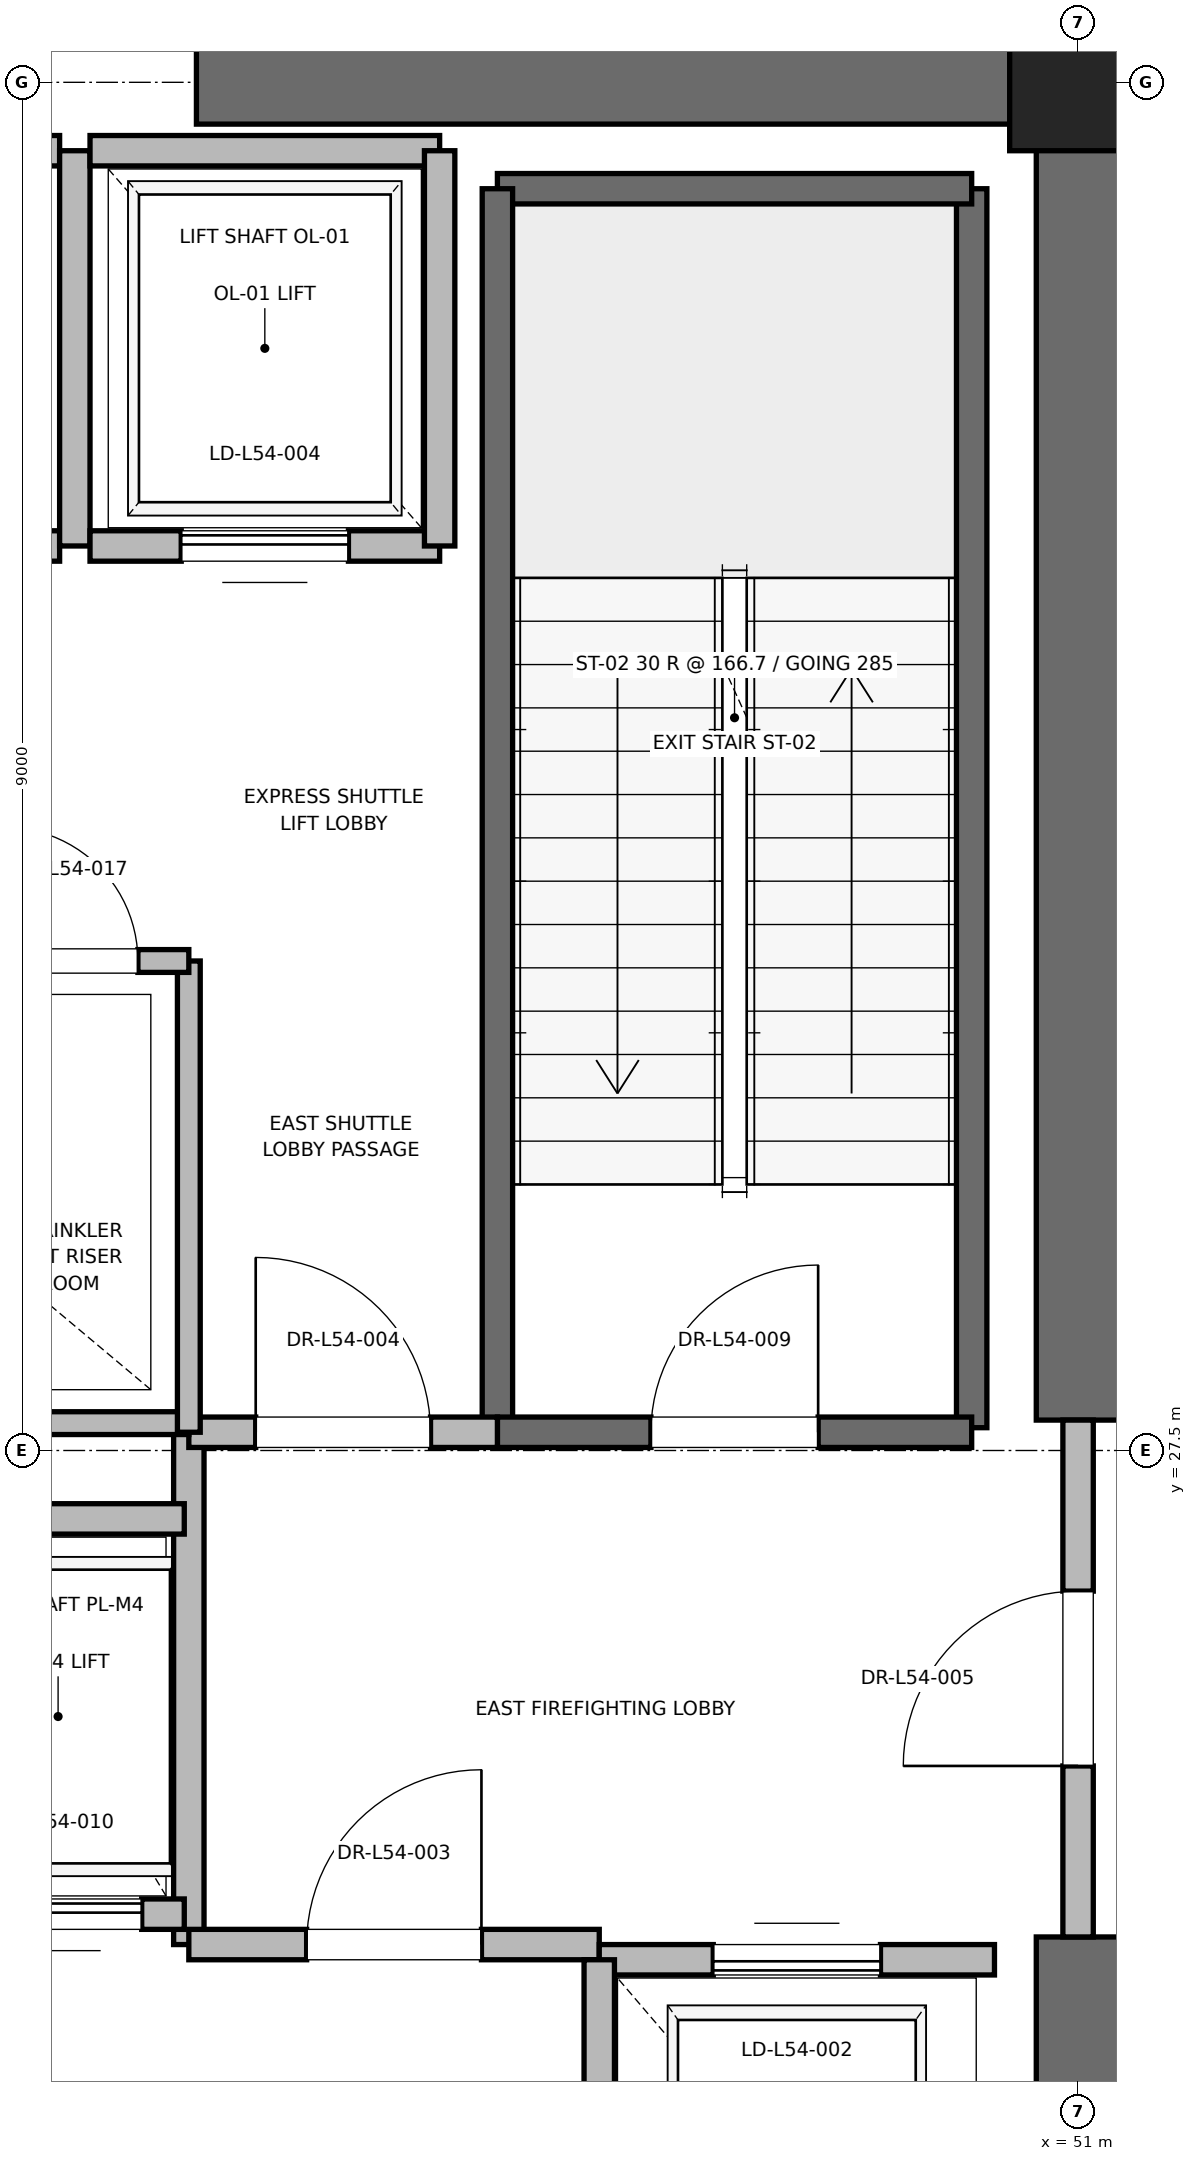
"""IFC4 building model, lengths in metres.
Left out: names, types, materials, properties, quantities, classifications, styles, units other than length and angle.
Written with IfcOpenShell. Run it as: python <this file> out.ifc"""

import sys

from ifc_helpers import new_model, si_unit, direction, frame, frame_2d, origin, origin_2d, place, context, subcontext, project, spatial, rectangle, extrude, element, fill, save


model = new_model("IFC4")
c1 = context("Model", 3, precision=1e-05, world=origin(), true_north=direction((0.0, 1.0)))
c2 = subcontext(c1, "Body", "Model", "MODEL_VIEW")
j1 = project(units=[si_unit("LENGTHUNIT", "METRE"), si_unit("PLANEANGLEUNIT", "RADIAN")], contexts=[c1])
p1 = place(None, origin())
s1 = spatial("IfcSite", under=j1, at=p1, CompositionType="ELEMENT")
p2 = place(p1, origin())
s2 = spatial("IfcBuilding", under=s1, at=p2, CompositionType="ELEMENT")
p3 = place(p2, frame((0.0, 0.0, 233.2)))
s3 = spatial("IfcBuildingStorey", under=s2, at=p3, CompositionType="ELEMENT", Elevation=233.2)
p4 = place(p3, frame((51.0, 36.5, 0.0), z_axis=(0.0, 0.0, 1.0), x_axis=(1.0, 0.0, 0.0)))
e1 = element("IfcColumn", 1, at=p4, inside=s3, PredefinedType="PILASTER", context=c2, shape_type="SweptSolid", body=[
    extrude(rectangle(XDim=0.9, YDim=0.9, at=origin_2d()), origin(), (0.0, 0.0, 1.0), 5.0),
])
for number, where, z_axis, x_axis in (
    (2, (45.2, 36.5, 0.0), (0.0, 0.0, 1.0), (1.0, 0.0, 0.0)),
    (3, (51.0, 18.5, 0.0), (0.0, 0.0, 1.0), (0.0, 1.0, 0.0)),
):
    element("IfcWall", number, at=place(p3, frame(where, z_axis=z_axis, x_axis=x_axis)), inside=s3, PredefinedType="SHEAR", context=c2, shape_type="SweptSolid", body=[
        extrude(rectangle(XDim=5.8, YDim=0.55, at=frame_2d((2.9, 0.0))), origin(), (0.0, 0.0, 1.0), 4.7),
    ])
p5 = place(p3, frame((51.0, 27.7, 0.0), z_axis=(0.0, 0.0, 1.0), x_axis=(0.0, 1.0, 0.0)))
e4 = element("IfcWall", 4, at=p5, inside=s3, PredefinedType="SHEAR", context=c2, shape_type="SweptSolid", body=[
    extrude(rectangle(XDim=8.8, YDim=0.55, at=frame_2d((4.4, 0.0))), origin(), (0.0, 0.0, 1.0), 4.7),
])
p6 = place(p3, frame((50.3, 27.65, 0.0), z_axis=(0.0, 0.0, 1.0), x_axis=(0.0, 1.0, 0.0)))
e5 = element("IfcWall", 5, at=p6, inside=s3, PredefinedType="SOLIDWALL", context=c2, shape_type="SweptSolid", body=[
    extrude(rectangle(XDim=8.15, YDim=0.2, at=frame_2d((4.075, 0.0))), origin(), (0.0, 0.0, 1.0), 4.7),
])
p7 = place(p3, frame((47.18, 35.8, 0.0), z_axis=(0.0, 0.0, 1.0), x_axis=(1.0, 0.0, 0.0)))
e6 = element("IfcWall", 6, at=p7, inside=s3, PredefinedType="SOLIDWALL", context=c2, shape_type="SweptSolid", body=[
    extrude(rectangle(XDim=3.12, YDim=0.2, at=frame_2d((1.56, 0.0))), origin(), (0.0, 0.0, 1.0), 4.7),
])
p8 = place(p3, frame((47.18, 27.62, 0.0), z_axis=(0.0, 0.0, 1.0), x_axis=(0.0, 1.0, 0.0)))
e7 = element("IfcWall", 7, at=p8, inside=s3, PredefinedType="SOLIDWALL", context=c2, shape_type="SweptSolid", body=[
    extrude(rectangle(XDim=8.18, YDim=0.2, at=frame_2d((4.09, 0.0))), origin(), (0.0, 0.0, 1.0), 4.7),
])
p9 = place(p3, frame((47.18, 27.62, 0.0), z_axis=(0.0, 0.0, 1.0), x_axis=(1.0, 0.0, 0.0)))
e8 = element("IfcWall", 8, at=p9, inside=s3, PredefinedType="SOLIDWALL", context=c2, shape_type="SweptSolid", body=[
    extrude(rectangle(XDim=3.12, YDim=0.2, at=frame_2d((1.56, 0.0))), origin(), (0.0, 0.0, 1.0), 4.7),
])
p10 = place(p9, frame((1.01, 0.0, 0.0)))
e9 = element("IfcOpeningElement", 9, at=p10, cuts=e8, PredefinedType="OPENING", context=c2, shape_type="SweptSolid", body=[
    extrude(rectangle(XDim=1.1, YDim=2.15, at=frame_2d((0.55, 1.075))), frame((0.0, 0.1, 0.0), z_axis=(0.0, -1.0, 0.0), x_axis=(1.0, 0.0, 0.0)), (0.0, 0.0, 1.0), 0.2),
])
p11 = place(p3, frame((45.15, 24.25, 0.0), z_axis=(0.0, 0.0, 1.0), x_axis=(0.0, 1.0, 0.0)))
e10 = element("IfcWall", 10, at=p11, inside=s3, PredefinedType="PARTITIONING", context=c2, shape_type="SweptSolid", body=[
    extrude(rectangle(XDim=3.37, YDim=0.2, at=frame_2d((1.685, 0.0))), origin(), (0.0, 0.0, 1.0), 4.7),
])
p12 = place(p3, frame((45.15, 24.25, 0.0), z_axis=(0.0, 0.0, 1.0), x_axis=(1.0, 0.0, 0.0)))
e11 = element("IfcWall", 11, at=p12, inside=s3, PredefinedType="PARTITIONING", context=c2, shape_type="SweptSolid", body=[
    extrude(rectangle(XDim=2.7, YDim=0.2, at=frame_2d((1.35, 0.0))), origin(), (0.0, 0.0, 1.0), 4.7),
])
p13 = place(p12, frame((0.775, 0.0, 0.0)))
e12 = element("IfcOpeningElement", 12, at=p13, cuts=e11, PredefinedType="OPENING", context=c2, shape_type="SweptSolid", body=[
    extrude(rectangle(XDim=1.15, YDim=2.2, at=frame_2d((0.575, 1.1))), frame((0.0, 0.1, 0.0), z_axis=(0.0, -1.0, 0.0), x_axis=(1.0, 0.0, 0.0)), (0.0, 0.0, 1.0), 0.2),
])
p14 = place(p3, frame((45.15, 27.62, 0.0), z_axis=(0.0, 0.0, 1.0), x_axis=(1.0, 0.0, 0.0)))
e13 = element("IfcWall", 13, at=p14, inside=s3, PredefinedType="PARTITIONING", context=c2, shape_type="SweptSolid", body=[
    extrude(rectangle(XDim=2.03, YDim=0.2, at=frame_2d((1.015, 0.0))), origin(), (0.0, 0.0, 1.0), 4.7),
])
p15 = place(p14, frame((0.44, 0.0, 0.0)))
e14 = element("IfcOpeningElement", 14, at=p15, cuts=e13, PredefinedType="OPENING", context=c2, shape_type="SweptSolid", body=[
    extrude(rectangle(XDim=1.15, YDim=2.2, at=frame_2d((0.575, 1.1))), frame((0.0, 0.1, 0.0), z_axis=(0.0, -1.0, 0.0), x_axis=(1.0, 0.0, 0.0)), (0.0, 0.0, 1.0), 0.2),
])
p16 = place(p3, frame((51.0, 24.3, 0.0), z_axis=(0.0, 0.0, 1.0), x_axis=(0.0, 1.0, 0.0)))
e15 = element("IfcWall", 15, at=p16, inside=s3, PredefinedType="PARTITIONING", context=c2, shape_type="SweptSolid", body=[
    extrude(rectangle(XDim=3.4, YDim=0.2, at=frame_2d((1.7, 0.0))), origin(), (0.0, 0.0, 1.0), 3.68),
])
p17 = place(p16, frame((1.125, 0.0, 0.0)))
e16 = element("IfcOpeningElement", 16, at=p17, cuts=e15, PredefinedType="OPENING", context=c2, shape_type="SweptSolid", body=[
    extrude(rectangle(XDim=1.15, YDim=2.2, at=frame_2d((0.575, 1.1))), frame((0.0, 0.1, 0.0), z_axis=(0.0, -1.0, 0.0), x_axis=(1.0, 0.0, 0.0)), (0.0, 0.0, 1.0), 0.2),
])
p18 = place(p3, frame((50.45, 24.15, 0.0), z_axis=(0.0, 0.0, 1.0), x_axis=(-1.0, 0.0, 0.0)))
e17 = element("IfcWall", 17, at=p18, inside=s3, PredefinedType="SOLIDWALL", context=c2, shape_type="SweptSolid", body=[
    extrude(rectangle(XDim=2.6, YDim=0.2, at=frame_2d((1.3, 0.0))), origin(), (0.0, 0.0, 1.0), 3.68),
])
p19 = place(p18, frame((0.75, 0.0, 0.0)))
e18 = element("IfcOpeningElement", 18, at=p19, cuts=e17, PredefinedType="OPENING", context=c2, shape_type="SweptSolid", body=[
    extrude(rectangle(XDim=1.1, YDim=2.2, at=frame_2d((0.55, 1.1))), frame((0.0, 0.1, 0.0), z_axis=(0.0, -1.0, 0.0), x_axis=(1.0, 0.0, 0.0)), (0.0, 0.0, 1.0), 0.2),
])
p20 = place(p3, frame((47.85, 24.15, 0.0), z_axis=(0.0, 0.0, 1.0), x_axis=(0.0, -1.0, 0.0)))
e19 = element("IfcWall", 19, at=p20, inside=s3, PredefinedType="SOLIDWALL", context=c2, shape_type="SweptSolid", body=[
    extrude(rectangle(XDim=3.0, YDim=0.2, at=frame_2d((1.5, 0.0))), origin(), (0.0, 0.0, 1.0), 4.7),
])
p21 = place(p3, frame((43.46, 24.45, 0.0), z_axis=(0.0, 0.0, 1.0), x_axis=(1.0, 0.0, 0.0)))
e20 = element("IfcWall", 20, at=p21, inside=s3, PredefinedType="SOLIDWALL", context=c2, shape_type="SweptSolid", body=[
    extrude(rectangle(XDim=1.66, YDim=0.2, at=frame_2d((0.83, 0.0))), origin(), (0.0, 0.0, 1.0), 4.7),
])
p22 = place(p21, frame((0.28, 0.0, 0.0)))
e21 = element("IfcOpeningElement", 21, at=p22, cuts=e20, PredefinedType="OPENING", context=c2, shape_type="SweptSolid", body=[
    extrude(rectangle(XDim=1.1, YDim=2.2, at=frame_2d((0.55, 1.1))), frame((0.0, 0.1, 0.0), z_axis=(0.0, -1.0, 0.0), x_axis=(1.0, 0.0, 0.0)), (0.0, 0.0, 1.0), 0.2),
])
p23 = place(p3, frame((45.12, 27.05, 0.0), z_axis=(0.0, 0.0, 1.0), x_axis=(-1.0, 0.0, 0.0)))
e22 = element("IfcWall", 22, at=p23, inside=s3, PredefinedType="SOLIDWALL", context=c2, shape_type="SweptSolid", body=[
    extrude(rectangle(XDim=1.66, YDim=0.2, at=frame_2d((0.83, 0.0))), origin(), (0.0, 0.0, 1.0), 4.7),
])
p24 = place(p3, frame((42.0, 33.45, 0.0), z_axis=(0.0, 0.0, 1.0), x_axis=(1.0, 0.0, 0.0)))
e23 = element("IfcWall", 23, at=p24, inside=s3, PredefinedType="SOLIDWALL", context=c2, shape_type="SweptSolid", body=[
    extrude(rectangle(XDim=2.3, YDim=0.2, at=frame_2d((1.15, 0.0))), origin(), (0.0, 0.0, 1.0), 4.7),
])
p25 = place(p24, frame((0.6, 0.0, 0.0)))
e24 = element("IfcOpeningElement", 24, at=p25, cuts=e23, PredefinedType="OPENING", context=c2, shape_type="SweptSolid", body=[
    extrude(rectangle(XDim=1.1, YDim=2.2, at=frame_2d((0.55, 1.1))), frame((0.0, 0.1, 0.0), z_axis=(0.0, -1.0, 0.0), x_axis=(1.0, 0.0, 0.0)), (0.0, 0.0, 1.0), 0.2),
])
p26 = place(p3, frame((44.3, 36.05, 0.0), z_axis=(0.0, 0.0, 1.0), x_axis=(-1.0, 0.0, 0.0)))
e25 = element("IfcWall", 25, at=p26, inside=s3, PredefinedType="SOLIDWALL", context=c2, shape_type="SweptSolid", body=[
    extrude(rectangle(XDim=2.3, YDim=0.2, at=frame_2d((1.15, 0.0))), origin(), (0.0, 0.0, 1.0), 3.68),
])
p27 = place(p3, frame((44.4, 33.45, 0.0), z_axis=(0.0, 0.0, 1.0), x_axis=(0.0, 1.0, 0.0)))
e26 = element("IfcWall", 26, at=p27, inside=s3, PredefinedType="SOLIDWALL", context=c2, shape_type="SweptSolid", body=[
    extrude(rectangle(XDim=2.6, YDim=0.2, at=frame_2d((1.3, 0.0))), origin(), (0.0, 0.0, 1.0), 3.68),
])
p28 = place(p3, frame((44.5, 33.45, 0.0), z_axis=(0.0, 0.0, 1.0), x_axis=(1.0, 0.0, 0.0)))
e27 = element("IfcWall", 27, at=p28, inside=s3, PredefinedType="SOLIDWALL", context=c2, shape_type="SweptSolid", body=[
    extrude(rectangle(XDim=2.3, YDim=0.2, at=frame_2d((1.15, 0.0))), origin(), (0.0, 0.0, 1.0), 4.7),
])
p29 = place(p28, frame((0.6, 0.0, 0.0)))
e28 = element("IfcOpeningElement", 28, at=p29, cuts=e27, PredefinedType="OPENING", context=c2, shape_type="SweptSolid", body=[
    extrude(rectangle(XDim=1.1, YDim=2.2, at=frame_2d((0.55, 1.1))), frame((0.0, 0.1, 0.0), z_axis=(0.0, -1.0, 0.0), x_axis=(1.0, 0.0, 0.0)), (0.0, 0.0, 1.0), 0.2),
])
p30 = place(p3, frame((46.8, 36.05, 0.0), z_axis=(0.0, 0.0, 1.0), x_axis=(-1.0, 0.0, 0.0)))
e29 = element("IfcWall", 29, at=p30, inside=s3, PredefinedType="SOLIDWALL", context=c2, shape_type="SweptSolid", body=[
    extrude(rectangle(XDim=2.3, YDim=0.2, at=frame_2d((1.15, 0.0))), origin(), (0.0, 0.0, 1.0), 3.68),
])
p31 = place(p3, frame((46.8, 33.45, 0.0), z_axis=(0.0, 0.0, 1.0), x_axis=(0.0, 1.0, 0.0)))
e30 = element("IfcWall", 30, at=p31, inside=s3, PredefinedType="SOLIDWALL", context=c2, shape_type="SweptSolid", body=[
    extrude(rectangle(XDim=2.6, YDim=0.2, at=frame_2d((1.3, 0.0))), origin(), (0.0, 0.0, 1.0), 4.7),
])
p32 = place(p3, frame((41.56, 27.68, 0.0), z_axis=(0.0, 0.0, 1.0), x_axis=(1.0, 0.0, 0.0)))
e31 = element("IfcWall", 31, at=p32, inside=s3, PredefinedType="PARTITIONING", context=c2, shape_type="SweptSolid", body=[
    extrude(rectangle(XDim=3.59, YDim=0.15, at=frame_2d((1.795, 0.0))), origin(), (0.0, 0.0, 1.0), 2.85),
])
p33 = place(p3, frame((45.15, 27.62, 0.0), z_axis=(0.0, 0.0, 1.0), x_axis=(0.0, 1.0, 0.0)))
e32 = element("IfcWall", 32, at=p33, inside=s3, PredefinedType="PARTITIONING", context=c2, shape_type="SweptSolid", body=[
    extrude(rectangle(XDim=3.1, YDim=0.15, at=frame_2d((1.55, 0.0))), origin(), (0.0, 0.0, 1.0), 2.85),
])
p34 = place(p3, frame((43.6, 30.72, 0.0), z_axis=(0.0, 0.0, 1.0), x_axis=(1.0, 0.0, 0.0)))
e33 = element("IfcWall", 33, at=p34, inside=s3, PredefinedType="PARTITIONING", context=c2, shape_type="SweptSolid", body=[
    extrude(rectangle(XDim=1.55, YDim=0.15, at=frame_2d((0.775, 0.0))), origin(), (0.0, 0.0, 1.0), 2.85),
])
p35 = place(p34, frame((0.335, 0.0, 0.0)))
e34 = element("IfcOpeningElement", 34, at=p35, cuts=e33, PredefinedType="OPENING", context=c2, shape_type="SweptSolid", body=[
    extrude(rectangle(XDim=0.88, YDim=2.1, at=frame_2d((0.44, 1.05))), frame((0.0, 0.075, 0.0), z_axis=(0.0, -1.0, 0.0), x_axis=(1.0, 0.0, 0.0)), (0.0, 0.0, 1.0), 0.15),
])
p36 = place(p10, origin())
e35 = element("IfcDoor", 35, at=p36, inside=s3, OperationType="SINGLE_SWING_RIGHT", PredefinedType="DOOR", context=c2, shape_type="SweptSolid", body=[
    extrude(rectangle(XDim=1.1, YDim=2.15, at=frame_2d((0.55, 1.075))), frame((0.0, 0.025, 0.0), z_axis=(0.0, -1.0, 0.0), x_axis=(1.0, 0.0, 0.0)), (0.0, 0.0, 1.0), 0.05),
])
fill(e9, e35)
p37 = place(p13, origin())
e36 = element("IfcDoor", 36, at=p37, inside=s3, OperationType="SINGLE_SWING_RIGHT", PredefinedType="DOOR", context=c2, shape_type="SweptSolid", body=[
    extrude(rectangle(XDim=1.15, YDim=2.2, at=frame_2d((0.575, 1.1))), frame((0.0, 0.025, 0.0), z_axis=(0.0, -1.0, 0.0), x_axis=(1.0, 0.0, 0.0)), (0.0, 0.0, 1.0), 0.05),
])
fill(e12, e36)
p38 = place(p15, origin())
e37 = element("IfcDoor", 37, at=p38, inside=s3, OperationType="SINGLE_SWING_LEFT", PredefinedType="DOOR", context=c2, shape_type="SweptSolid", body=[
    extrude(rectangle(XDim=1.15, YDim=2.2, at=frame_2d((0.575, 1.1))), frame((0.0, 0.025, 0.0), z_axis=(0.0, -1.0, 0.0), x_axis=(1.0, 0.0, 0.0)), (0.0, 0.0, 1.0), 0.05),
])
fill(e14, e37)
p39 = place(p17, origin())
e38 = element("IfcDoor", 38, at=p39, inside=s3, OperationType="SINGLE_SWING_LEFT", PredefinedType="DOOR", context=c2, shape_type="SweptSolid", body=[
    extrude(rectangle(XDim=1.15, YDim=2.2, at=frame_2d((0.575, 1.1))), frame((0.0, 0.025, 0.0), z_axis=(0.0, -1.0, 0.0), x_axis=(1.0, 0.0, 0.0)), (0.0, 0.0, 1.0), 0.05),
])
fill(e16, e38)
p40 = place(p19, origin())
e39 = element("IfcDoor", 39, at=p40, inside=s3, OperationType="SLIDING_TO_RIGHT", PredefinedType="DOOR", context=c2, shape_type="SweptSolid", body=[
    extrude(rectangle(XDim=1.1, YDim=2.2, at=frame_2d((0.55, 1.1))), frame((0.0, 0.025, 0.0), z_axis=(0.0, -1.0, 0.0), x_axis=(1.0, 0.0, 0.0)), (0.0, 0.0, 1.0), 0.05),
])
fill(e18, e39)
p41 = place(p22, origin())
e40 = element("IfcDoor", 40, at=p41, inside=s3, OperationType="SLIDING_TO_RIGHT", PredefinedType="DOOR", context=c2, shape_type="SweptSolid", body=[
    extrude(rectangle(XDim=1.1, YDim=2.2, at=frame_2d((0.55, 1.1))), frame((0.0, 0.025, 0.0), z_axis=(0.0, -1.0, 0.0), x_axis=(1.0, 0.0, 0.0)), (0.0, 0.0, 1.0), 0.05),
])
fill(e21, e40)
p42 = place(p29, origin())
e41 = element("IfcDoor", 41, at=p42, inside=s3, OperationType="SLIDING_TO_RIGHT", PredefinedType="DOOR", context=c2, shape_type="SweptSolid", body=[
    extrude(rectangle(XDim=1.1, YDim=2.2, at=frame_2d((0.55, 1.1))), frame((0.0, 0.025, 0.0), z_axis=(0.0, -1.0, 0.0), x_axis=(1.0, 0.0, 0.0)), (0.0, 0.0, 1.0), 0.05),
])
fill(e28, e41)
p43 = place(p35, origin())
e42 = element("IfcDoor", 42, at=p43, inside=s3, OperationType="SINGLE_SWING_LEFT", PredefinedType="DOOR", context=c2, shape_type="SweptSolid", body=[
    extrude(rectangle(XDim=0.88, YDim=2.1, at=frame_2d((0.44, 1.05))), frame((0.0, 0.025, 0.0), z_axis=(0.0, -1.0, 0.0), x_axis=(1.0, 0.0, 0.0)), (0.0, 0.0, 1.0), 0.05),
])
fill(e34, e42)
save(model, sys.argv[1])
